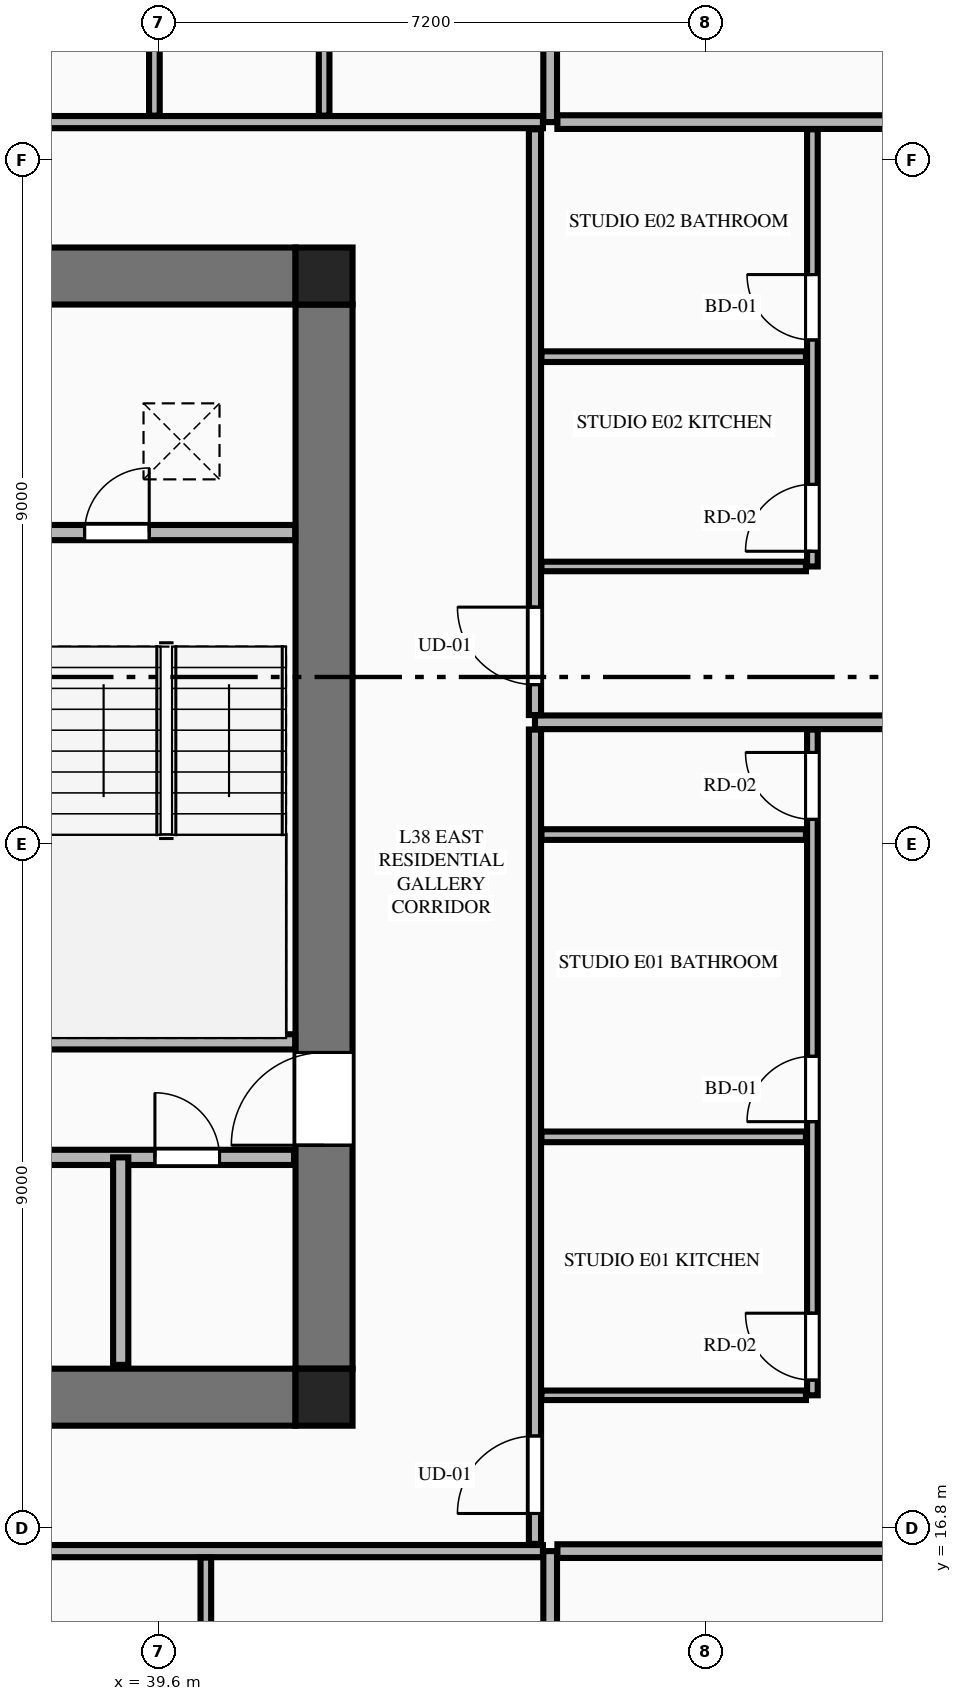
"""IFC4 building model, lengths in metres.
Left out: names, types, materials, properties, quantities, classifications, styles, units other than length and angle.
Written with IfcOpenShell. Run it as: python <this file> out.ifc"""

import sys

from ifc_helpers import new_model, si_unit, direction, frame, frame_2d, origin, origin_2d, place, context, subcontext, project, spatial, rectangle, extrude, element, fill, save


model = new_model("IFC4")
c1 = context("Model", 3, precision=1e-05, world=origin(), true_north=direction((0.0, 1.0)))
c2 = subcontext(c1, "Body", "Model", "MODEL_VIEW")
j1 = project(units=[si_unit("LENGTHUNIT", "METRE"), si_unit("PLANEANGLEUNIT", "RADIAN")], contexts=[c1])
p1 = place(None, origin())
s1 = spatial("IfcSite", under=j1, at=p1, CompositionType="ELEMENT")
p2 = place(p1, origin())
s2 = spatial("IfcBuilding", under=s1, at=p2, CompositionType="ELEMENT")
p3 = place(p2, frame((0.0, 0.0, 144.55)))
s3 = spatial("IfcBuildingStorey", under=s2, at=p3, CompositionType="ELEMENT", Elevation=144.55)
for number, where, z_axis, x_axis in (
    (1, (41.775, 18.525, 0.0), (0.0, 0.0, 1.0), (1.0, 0.0, 0.0)),
    (2, (41.775, 33.275, 0.0), (0.0, 0.0, 1.0), (1.0, 0.0, 0.0)),
):
    element("IfcColumn", number, at=place(p3, frame(where, z_axis=z_axis, x_axis=x_axis)), inside=s3, PredefinedType="COLUMN", context=c2, shape_type="SweptSolid", body=[
        extrude(rectangle(XDim=0.75, YDim=0.75, at=origin_2d()), origin(), (0.0, 0.0, 1.0), 3.55),
    ])
for number, where, z_axis, x_axis in (
    (3, (23.4, 18.525, 0.0), (0.0, 0.0, 1.0), (1.0, 0.0, 0.0)),
    (4, (23.4, 33.275, 0.0), (0.0, 0.0, 1.0), (1.0, 0.0, 0.0)),
):
    element("IfcWall", number, at=place(p3, frame(where, z_axis=z_axis, x_axis=x_axis)), inside=s3, PredefinedType="SHEAR", context=c2, shape_type="SweptSolid", body=[
        extrude(rectangle(XDim=18.0, YDim=0.75, at=frame_2d((9.0, 0.0))), origin(), (0.0, 0.0, 1.0), 3.27),
    ])
p4 = place(p3, frame((41.775, 18.9, 0.0), z_axis=(0.0, 0.0, 1.0), x_axis=(0.0, 1.0, 0.0)))
e5 = element("IfcWall", 5, at=p4, inside=s3, PredefinedType="SHEAR", context=c2, shape_type="SweptSolid", body=[
    extrude(rectangle(XDim=14.0, YDim=0.75, at=frame_2d((7.0, 0.0))), origin(), (0.0, 0.0, 1.0), 3.27),
])
p5 = place(p4, frame((2.94, 0.0, 0.0)))
e6 = element("IfcOpeningElement", 6, at=p5, cuts=e5, PredefinedType="OPENING", context=c2, shape_type="SweptSolid", body=[
    extrude(rectangle(XDim=1.22, YDim=2.25, at=frame_2d((0.61, 1.125))), frame((0.0, 0.385, 0.0), z_axis=(0.0, -1.0, 0.0), x_axis=(1.0, 0.0, 0.0)), (0.0, 0.0, 1.0), 0.77),
])
p6 = place(p3, frame((38.125, 23.2, 0.0), z_axis=(0.0, 0.0, 1.0), x_axis=(1.0, 0.0, 0.0)))
e7 = element("IfcWall", 7, at=p6, inside=s3, PredefinedType="PLUMBINGWALL", context=c2, shape_type="SweptSolid", body=[
    extrude(rectangle(XDim=3.27, YDim=0.2, at=frame_2d((1.635, 0.0))), origin(), (0.0, 0.0, 1.0), 3.27),
])
p7 = place(p3, frame((38.125, 29.9, 0.0), z_axis=(0.0, 0.0, 1.0), x_axis=(1.0, 0.0, 0.0)))
e8 = element("IfcWall", 8, at=p7, inside=s3, PredefinedType="PLUMBINGWALL", context=c2, shape_type="SweptSolid", body=[
    extrude(rectangle(XDim=3.27, YDim=0.2, at=frame_2d((1.635, 0.0))), origin(), (0.0, 0.0, 1.0), 3.27),
])
p8 = place(p7, frame((0.5, 0.0, 0.0)))
e9 = element("IfcOpeningElement", 9, at=p8, cuts=e8, PredefinedType="OPENING", context=c2, shape_type="SweptSolid", body=[
    extrude(rectangle(XDim=0.85, YDim=2.05, at=frame_2d((0.425, 1.025))), frame((0.0, 0.11, 0.0), z_axis=(0.0, -1.0, 0.0), x_axis=(1.0, 0.0, 0.0)), (0.0, 0.0, 1.0), 0.22),
])
p9 = place(p3, frame((23.42, 21.68, 0.0), z_axis=(0.0, 0.0, 1.0), x_axis=(1.0, 0.0, 0.0)))
e10 = element("IfcWall", 10, at=p9, inside=s3, PredefinedType="PLUMBINGWALL", context=c2, shape_type="SweptSolid", body=[
    extrude(rectangle(XDim=17.96, YDim=0.2, at=frame_2d((8.98, 0.0))), origin(), (0.0, 0.0, 1.0), 3.27),
])
p10 = place(p9, frame((11.6, 0.0, 0.0)))
e11 = element("IfcOpeningElement", 11, at=p10, cuts=e10, PredefinedType="OPENING", context=c2, shape_type="SweptSolid", body=[
    extrude(rectangle(XDim=1.1, YDim=2.2, at=frame_2d((0.55, 1.1))), frame((0.0, 0.11, 0.0), z_axis=(0.0, -1.0, 0.0), x_axis=(1.0, 0.0, 0.0)), (0.0, 0.0, 1.0), 0.22),
])
p11 = place(p9, frame((0.41, 0.0, 0.0)))
e12 = element("IfcOpeningElement", 12, at=p11, cuts=e10, PredefinedType="OPENING", context=c2, shape_type="SweptSolid", body=[
    extrude(rectangle(XDim=0.85, YDim=2.05, at=frame_2d((0.425, 1.025))), frame((0.0, 0.11, 0.0), z_axis=(0.0, -1.0, 0.0), x_axis=(1.0, 0.0, 0.0)), (0.0, 0.0, 1.0), 0.22),
])
p12 = place(p9, frame((13.78, 0.0, 0.0)))
e13 = element("IfcOpeningElement", 13, at=p12, cuts=e10, PredefinedType="OPENING", context=c2, shape_type="SweptSolid", body=[
    extrude(rectangle(XDim=0.85, YDim=2.05, at=frame_2d((0.425, 1.025))), frame((0.0, 0.11, 0.0), z_axis=(0.0, -1.0, 0.0), x_axis=(1.0, 0.0, 0.0)), (0.0, 0.0, 1.0), 0.22),
])
p13 = place(p9, frame((16.13, 0.0, 0.0)))
e14 = element("IfcOpeningElement", 14, at=p13, cuts=e10, PredefinedType="OPENING", context=c2, shape_type="SweptSolid", body=[
    extrude(rectangle(XDim=0.85, YDim=2.05, at=frame_2d((0.425, 1.025))), frame((0.0, 0.11, 0.0), z_axis=(0.0, -1.0, 0.0), x_axis=(1.0, 0.0, 0.0)), (0.0, 0.0, 1.0), 0.22),
])
p14 = place(p3, frame((39.1, 18.95, 0.0), z_axis=(0.0, 0.0, 1.0), x_axis=(0.0, 1.0, 0.0)))
e15 = element("IfcWall", 15, at=p14, inside=s3, PredefinedType="PLUMBINGWALL", context=c2, shape_type="SweptSolid", body=[
    extrude(rectangle(XDim=2.73, YDim=0.2, at=frame_2d((1.365, 0.0))), origin(), (0.0, 0.0, 1.0), 3.27),
])
p15 = place(p3, frame((44.75, 4.105, 0.0), z_axis=(0.0, 0.0, 1.0), x_axis=(0.0, 1.0, 0.0)))
e16 = element("IfcWall", 16, at=p15, inside=s3, PredefinedType="PARTITIONING", context=c2, shape_type="SweptSolid", body=[
    extrude(rectangle(XDim=12.395, YDim=0.18, at=frame_2d((6.198, 0.0))), origin(), (0.0, 0.0, 1.0), 3.27),
])
p16 = place(p3, frame((20.145, 16.5, 0.0), z_axis=(0.0, 0.0, 1.0), x_axis=(1.0, 0.0, 0.0)))
e17 = element("IfcWall", 17, at=p16, inside=s3, PredefinedType="PARTITIONING", context=c2, shape_type="SweptSolid", body=[
    extrude(rectangle(XDim=24.51, YDim=0.16, at=frame_2d((12.255, 0.0))), origin(), (0.0, 0.0, 1.0), 3.27),
])
p17 = place(p16, frame((0.405, 0.0, 0.0)))
e18 = element("IfcOpeningElement", 18, at=p17, cuts=e17, PredefinedType="OPENING", context=c2, shape_type="SweptSolid", body=[
    extrude(rectangle(XDim=1.35, YDim=2.35, at=frame_2d((0.675, 1.175))), frame((0.0, 0.09, 0.0), z_axis=(0.0, -1.0, 0.0), x_axis=(1.0, 0.0, 0.0)), (0.0, 0.0, 1.0), 0.18),
])
p18 = place(p3, frame((40.22, 12.267, 0.0), z_axis=(0.0, 0.0, 1.0), x_axis=(0.0, 1.0, 0.0)))
e19 = element("IfcWall", 19, at=p18, inside=s3, PredefinedType="PLUMBINGWALL", context=c2, shape_type="SweptSolid", body=[
    extrude(rectangle(XDim=4.148, YDim=0.14, at=frame_2d((2.074, 0.0))), origin(), (0.0, 0.0, 1.0), 3.27),
])
p19 = place(p3, frame((44.75, 35.3, 0.0), z_axis=(0.0, 0.0, 1.0), x_axis=(0.0, 1.0, 0.0)))
e20 = element("IfcWall", 20, at=p19, inside=s3, PredefinedType="PARTITIONING", context=c2, shape_type="SweptSolid", body=[
    extrude(rectangle(XDim=12.195, YDim=0.18, at=frame_2d((6.098, 0.0))), origin(), (0.0, 0.0, 1.0), 3.27),
])
p20 = place(p3, frame((20.145, 35.3, 0.0), z_axis=(0.0, 0.0, 1.0), x_axis=(1.0, 0.0, 0.0)))
e21 = element("IfcWall", 21, at=p20, inside=s3, PredefinedType="PARTITIONING", context=c2, shape_type="SweptSolid", body=[
    extrude(rectangle(XDim=24.51, YDim=0.16, at=frame_2d((12.255, 0.0))), origin(), (0.0, 0.0, 1.0), 3.27),
])
p21 = place(p20, frame((0.405, 0.0, 0.0)))
e22 = element("IfcOpeningElement", 22, at=p21, cuts=e21, PredefinedType="OPENING", context=c2, shape_type="SweptSolid", body=[
    extrude(rectangle(XDim=1.35, YDim=2.35, at=frame_2d((0.675, 1.175))), frame((0.0, 0.09, 0.0), z_axis=(0.0, -1.0, 0.0), x_axis=(1.0, 0.0, 0.0)), (0.0, 0.0, 1.0), 0.18),
])
p22 = place(p3, frame((39.543, 35.385, 0.0), z_axis=(0.0, 0.0, 1.0), x_axis=(0.0, 1.0, 0.0)))
e23 = element("IfcWall", 23, at=p22, inside=s3, PredefinedType="PLUMBINGWALL", context=c2, shape_type="SweptSolid", body=[
    extrude(rectangle(XDim=6.151, YDim=0.14, at=frame_2d((3.075, 0.0))), origin(), (0.0, 0.0, 1.0), 3.27),
])
p23 = place(p3, frame((41.776, 35.385, 0.0), z_axis=(0.0, 0.0, 1.0), x_axis=(0.0, 1.0, 0.0)))
e24 = element("IfcWall", 24, at=p23, inside=s3, PredefinedType="PLUMBINGWALL", context=c2, shape_type="SweptSolid", body=[
    extrude(rectangle(XDim=6.171, YDim=0.14, at=frame_2d((3.085, 0.0))), origin(), (0.0, 0.0, 1.0), 2.652),
])
p24 = place(p3, frame((44.845, 16.5, 0.0), z_axis=(0.0, 0.0, 1.0), x_axis=(1.0, 0.0, 0.0)))
e25 = element("IfcWall", 25, at=p24, inside=s3, PredefinedType="PARTITIONING", context=c2, shape_type="SweptSolid", body=[
    extrude(rectangle(XDim=7.77, YDim=0.18, at=frame_2d((3.885, 0.0))), origin(), (0.0, 0.0, 1.0), 3.27),
])
p25 = place(p3, frame((44.845, 35.3, 0.0), z_axis=(0.0, 0.0, 1.0), x_axis=(1.0, 0.0, 0.0)))
e26 = element("IfcWall", 26, at=p25, inside=s3, PredefinedType="PARTITIONING", context=c2, shape_type="SweptSolid", body=[
    extrude(rectangle(XDim=7.669, YDim=0.18, at=frame_2d((3.834, 0.0))), origin(), (0.0, 0.0, 1.0), 3.27),
])
p26 = place(p3, frame((44.55, 16.595, 0.0), z_axis=(0.0, 0.0, 1.0), x_axis=(0.0, 1.0, 0.0)))
e27 = element("IfcWall", 27, at=p26, inside=s3, PredefinedType="PARTITIONING", context=c2, shape_type="SweptSolid", body=[
    extrude(rectangle(XDim=10.714, YDim=0.16, at=frame_2d((5.357, 0.0))), origin(), (0.0, 0.0, 1.0), 3.27),
])
p27 = place(p26, frame((0.4, 0.0, 0.0)))
e28 = element("IfcOpeningElement", 28, at=p27, cuts=e27, PredefinedType="OPENING", context=c2, shape_type="SweptSolid", body=[
    extrude(rectangle(XDim=1.02, YDim=2.25, at=frame_2d((0.51, 1.125))), frame((0.0, 0.09, 0.0), z_axis=(0.0, -1.0, 0.0), x_axis=(1.0, 0.0, 0.0)), (0.0, 0.0, 1.0), 0.18),
])
p28 = place(p3, frame((44.635, 18.55, 0.0), z_axis=(0.0, 0.0, 1.0), x_axis=(1.0, 0.0, 0.0)))
e29 = element("IfcWall", 29, at=p28, inside=s3, PredefinedType="PARTITIONING", context=c2, shape_type="SweptSolid", body=[
    extrude(rectangle(XDim=3.48, YDim=0.125, at=frame_2d((1.74, 0.0))), origin(), (0.0, 0.0, 1.0), 2.652),
])
p29 = place(p3, frame((48.2, 18.55, 0.0), z_axis=(0.0, 0.0, 1.0), x_axis=(0.0, 1.0, 0.0)))
e30 = element("IfcWall", 30, at=p29, inside=s3, PredefinedType="PLUMBINGWALL", context=c2, shape_type="SweptSolid", body=[
    extrude(rectangle(XDim=8.759, YDim=0.14, at=frame_2d((4.379, 0.0))), origin(), (0.0, 0.0, 1.0), 3.27),
])
p30 = place(p29, frame((3.6, 0.0, 0.0)))
e31 = element("IfcOpeningElement", 31, at=p30, cuts=e30, PredefinedType="OPENING", context=c2, shape_type="SweptSolid", body=[
    extrude(rectangle(XDim=0.86, YDim=2.1, at=frame_2d((0.43, 1.05))), frame((0.0, 0.08, 0.0), z_axis=(0.0, -1.0, 0.0), x_axis=(1.0, 0.0, 0.0)), (0.0, 0.0, 1.0), 0.16),
])
p31 = place(p29, frame((7.577, 0.0, 0.0)))
e32 = element("IfcOpeningElement", 32, at=p31, cuts=e30, PredefinedType="OPENING", context=c2, shape_type="SweptSolid", body=[
    extrude(rectangle(XDim=0.88, YDim=2.15, at=frame_2d((0.44, 1.075))), frame((0.0, 0.08, 0.0), z_axis=(0.0, -1.0, 0.0), x_axis=(1.0, 0.0, 0.0)), (0.0, 0.0, 1.0), 0.16),
])
p32 = place(p29, frame((0.2, 0.0, 0.0)))
e33 = element("IfcOpeningElement", 33, at=p32, cuts=e30, PredefinedType="OPENING", context=c2, shape_type="SweptSolid", body=[
    extrude(rectangle(XDim=0.88, YDim=2.15, at=frame_2d((0.44, 1.075))), frame((0.0, 0.08, 0.0), z_axis=(0.0, -1.0, 0.0), x_axis=(1.0, 0.0, 0.0)), (0.0, 0.0, 1.0), 0.16),
])
for number, where, z_axis, x_axis in (
    (34, (44.635, 21.95, 0.0), (0.0, 0.0, 1.0), (1.0, 0.0, 0.0)),
    (35, (44.635, 25.927, 0.0), (0.0, 0.0, 1.0), (1.0, 0.0, 0.0)),
):
    element("IfcWall", number, at=place(p3, frame(where, z_axis=z_axis, x_axis=x_axis)), inside=s3, PredefinedType="PLUMBINGWALL", context=c2, shape_type="SweptSolid", body=[
        extrude(rectangle(XDim=3.48, YDim=0.14, at=frame_2d((1.74, 0.0))), origin(), (0.0, 0.0, 1.0), 3.27),
    ])
p33 = place(p3, frame((44.55, 27.404, 0.0), z_axis=(0.0, 0.0, 1.0), x_axis=(1.0, 0.0, 0.0)))
e36 = element("IfcWall", 36, at=p33, inside=s3, PredefinedType="PARTITIONING", context=c2, shape_type="SweptSolid", body=[
    extrude(rectangle(XDim=11.959, YDim=0.18, at=frame_2d((5.979, 0.0))), origin(), (0.0, 0.0, 1.0), 3.27),
])
p34 = place(p3, frame((44.55, 27.499, 0.0), z_axis=(0.0, 0.0, 1.0), x_axis=(0.0, 1.0, 0.0)))
e37 = element("IfcWall", 37, at=p34, inside=s3, PredefinedType="PARTITIONING", context=c2, shape_type="SweptSolid", body=[
    extrude(rectangle(XDim=7.706, YDim=0.16, at=frame_2d((3.853, 0.0))), origin(), (0.0, 0.0, 1.0), 3.27),
])
p35 = place(p34, frame((0.4, 0.0, 0.0)))
e38 = element("IfcOpeningElement", 38, at=p35, cuts=e37, PredefinedType="OPENING", context=c2, shape_type="SweptSolid", body=[
    extrude(rectangle(XDim=1.02, YDim=2.25, at=frame_2d((0.51, 1.125))), frame((0.0, 0.09, 0.0), z_axis=(0.0, -1.0, 0.0), x_axis=(1.0, 0.0, 0.0)), (0.0, 0.0, 1.0), 0.18),
])
p36 = place(p3, frame((44.635, 29.454, 0.0), z_axis=(0.0, 0.0, 1.0), x_axis=(1.0, 0.0, 0.0)))
e39 = element("IfcWall", 39, at=p36, inside=s3, PredefinedType="PARTITIONING", context=c2, shape_type="SweptSolid", body=[
    extrude(rectangle(XDim=3.48, YDim=0.125, at=frame_2d((1.74, 0.0))), origin(), (0.0, 0.0, 1.0), 3.27),
])
p37 = place(p3, frame((48.2, 29.454, 0.0), z_axis=(0.0, 0.0, 1.0), x_axis=(0.0, 1.0, 0.0)))
e40 = element("IfcWall", 40, at=p37, inside=s3, PredefinedType="PLUMBINGWALL", context=c2, shape_type="SweptSolid", body=[
    extrude(rectangle(XDim=5.751, YDim=0.14, at=frame_2d((2.875, 0.0))), origin(), (0.0, 0.0, 1.0), 3.27),
])
p38 = place(p37, frame((2.98, 0.0, 0.0)))
e41 = element("IfcOpeningElement", 41, at=p38, cuts=e40, PredefinedType="OPENING", context=c2, shape_type="SweptSolid", body=[
    extrude(rectangle(XDim=0.86, YDim=2.1, at=frame_2d((0.43, 1.05))), frame((0.0, 0.08, 0.0), z_axis=(0.0, -1.0, 0.0), x_axis=(1.0, 0.0, 0.0)), (0.0, 0.0, 1.0), 0.16),
])
p39 = place(p37, frame((0.2, 0.0, 0.0)))
e42 = element("IfcOpeningElement", 42, at=p39, cuts=e40, PredefinedType="OPENING", context=c2, shape_type="SweptSolid", body=[
    extrude(rectangle(XDim=0.88, YDim=2.15, at=frame_2d((0.44, 1.075))), frame((0.0, 0.08, 0.0), z_axis=(0.0, -1.0, 0.0), x_axis=(1.0, 0.0, 0.0)), (0.0, 0.0, 1.0), 0.16),
])
p40 = place(p3, frame((44.635, 32.214, 0.0), z_axis=(0.0, 0.0, 1.0), x_axis=(1.0, 0.0, 0.0)))
e43 = element("IfcWall", 43, at=p40, inside=s3, PredefinedType="PLUMBINGWALL", context=c2, shape_type="SweptSolid", body=[
    extrude(rectangle(XDim=3.48, YDim=0.14, at=frame_2d((1.74, 0.0))), origin(), (0.0, 0.0, 1.0), 3.27),
])
p41 = place(p5, origin())
e44 = element("IfcDoor", 44, at=p41, inside=s3, OperationType="SINGLE_SWING_LEFT", PredefinedType="DOOR", context=c2, shape_type="SweptSolid", body=[
    extrude(rectangle(XDim=1.22, YDim=2.25, at=frame_2d((0.61, 1.125))), frame((0.0, 0.025, 0.0), z_axis=(0.0, -1.0, 0.0), x_axis=(1.0, 0.0, 0.0)), (0.0, 0.0, 1.0), 0.05),
])
fill(e6, e44)
p42 = place(p8, origin())
e45 = element("IfcDoor", 45, at=p42, inside=s3, OperationType="SINGLE_SWING_RIGHT", PredefinedType="DOOR", context=c2, shape_type="SweptSolid", body=[
    extrude(rectangle(XDim=0.85, YDim=2.05, at=frame_2d((0.425, 1.025))), frame((0.0, 0.025, 0.0), z_axis=(0.0, -1.0, 0.0), x_axis=(1.0, 0.0, 0.0)), (0.0, 0.0, 1.0), 0.05),
])
fill(e9, e45)
p43 = place(p13, origin())
e46 = element("IfcDoor", 46, at=p43, inside=s3, OperationType="SINGLE_SWING_LEFT", PredefinedType="DOOR", context=c2, shape_type="SweptSolid", body=[
    extrude(rectangle(XDim=0.85, YDim=2.05, at=frame_2d((0.425, 1.025))), frame((0.0, 0.025, 0.0), z_axis=(0.0, -1.0, 0.0), x_axis=(1.0, 0.0, 0.0)), (0.0, 0.0, 1.0), 0.05),
])
fill(e14, e46)
p44 = place(p30, origin())
e47 = element("IfcDoor", 47, at=p44, inside=s3, OperationType="SINGLE_SWING_LEFT", PredefinedType="DOOR", context=c2, shape_type="SweptSolid", body=[
    extrude(rectangle(XDim=0.86, YDim=2.1, at=frame_2d((0.43, 1.05))), frame((0.0, 0.025, 0.0), z_axis=(0.0, -1.0, 0.0), x_axis=(1.0, 0.0, 0.0)), (0.0, 0.0, 1.0), 0.05),
])
fill(e31, e47)
p45 = place(p31, origin())
e48 = element("IfcDoor", 48, at=p45, inside=s3, OperationType="SINGLE_SWING_RIGHT", PredefinedType="DOOR", context=c2, shape_type="SweptSolid", body=[
    extrude(rectangle(XDim=0.88, YDim=2.15, at=frame_2d((0.44, 1.075))), frame((0.0, 0.025, 0.0), z_axis=(0.0, -1.0, 0.0), x_axis=(1.0, 0.0, 0.0)), (0.0, 0.0, 1.0), 0.05),
])
fill(e32, e48)
p46 = place(p27, origin())
e49 = element("IfcDoor", 49, at=p46, inside=s3, OperationType="SINGLE_SWING_LEFT", PredefinedType="DOOR", context=c2, shape_type="SweptSolid", body=[
    extrude(rectangle(XDim=1.02, YDim=2.25, at=frame_2d((0.51, 1.125))), frame((0.0, 0.025, 0.0), z_axis=(0.0, -1.0, 0.0), x_axis=(1.0, 0.0, 0.0)), (0.0, 0.0, 1.0), 0.05),
])
fill(e28, e49)
p47 = place(p32, origin())
e50 = element("IfcDoor", 50, at=p47, inside=s3, OperationType="SINGLE_SWING_RIGHT", PredefinedType="DOOR", context=c2, shape_type="SweptSolid", body=[
    extrude(rectangle(XDim=0.88, YDim=2.15, at=frame_2d((0.44, 1.075))), frame((0.0, 0.025, 0.0), z_axis=(0.0, -1.0, 0.0), x_axis=(1.0, 0.0, 0.0)), (0.0, 0.0, 1.0), 0.05),
])
fill(e33, e50)
p48 = place(p38, origin())
e51 = element("IfcDoor", 51, at=p48, inside=s3, OperationType="SINGLE_SWING_RIGHT", PredefinedType="DOOR", context=c2, shape_type="SweptSolid", body=[
    extrude(rectangle(XDim=0.86, YDim=2.1, at=frame_2d((0.43, 1.05))), frame((0.0, 0.025, 0.0), z_axis=(0.0, -1.0, 0.0), x_axis=(1.0, 0.0, 0.0)), (0.0, 0.0, 1.0), 0.05),
])
fill(e41, e51)
p49 = place(p35, origin())
e52 = element("IfcDoor", 52, at=p49, inside=s3, OperationType="SINGLE_SWING_RIGHT", PredefinedType="DOOR", context=c2, shape_type="SweptSolid", body=[
    extrude(rectangle(XDim=1.02, YDim=2.25, at=frame_2d((0.51, 1.125))), frame((0.0, 0.025, 0.0), z_axis=(0.0, -1.0, 0.0), x_axis=(1.0, 0.0, 0.0)), (0.0, 0.0, 1.0), 0.05),
])
fill(e38, e52)
p50 = place(p39, origin())
e53 = element("IfcDoor", 53, at=p50, inside=s3, OperationType="SINGLE_SWING_LEFT", PredefinedType="DOOR", context=c2, shape_type="SweptSolid", body=[
    extrude(rectangle(XDim=0.88, YDim=2.15, at=frame_2d((0.44, 1.075))), frame((0.0, 0.025, 0.0), z_axis=(0.0, -1.0, 0.0), x_axis=(1.0, 0.0, 0.0)), (0.0, 0.0, 1.0), 0.05),
])
fill(e42, e53)
save(model, sys.argv[1])
